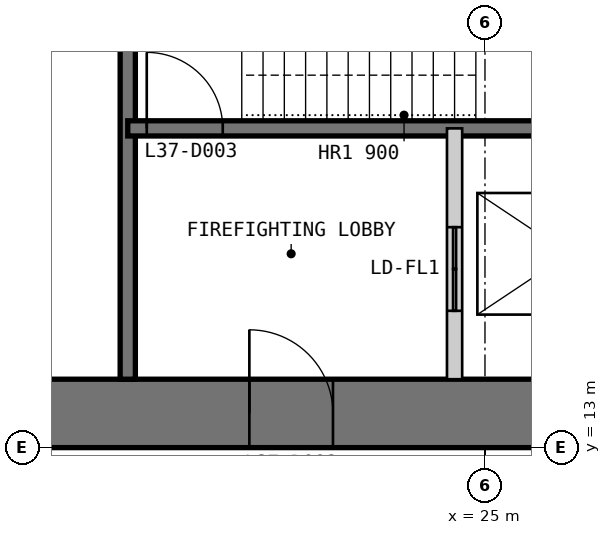
"""IFC4 building model, lengths in metres.
Left out: names, types, materials, properties, quantities, classifications, styles, units other than length and angle.
Written with IfcOpenShell. Run it as: python <this file> out.ifc"""

import sys

from ifc_helpers import new_model, si_unit, direction, frame, frame_2d, origin, place, context, subcontext, project, spatial, polyline, rectangle, outline, extrude, element, fill, save


model = new_model("IFC4")
c1 = context("Model", 3, precision=1e-05, world=origin(), true_north=direction((0.0, 1.0)))
c2 = subcontext(c1, "Body", "Model", "MODEL_VIEW")
j1 = project(units=[si_unit("LENGTHUNIT", "METRE"), si_unit("PLANEANGLEUNIT", "RADIAN")], contexts=[c1])
p1 = place(None, origin())
s1 = spatial("IfcSite", under=j1, at=p1, CompositionType="ELEMENT")
p2 = place(p1, origin())
s2 = spatial("IfcBuilding", under=s1, at=p2, CompositionType="ELEMENT")
p3 = place(p2, frame((0.0, 0.0, 158.4)))
s3 = spatial("IfcBuildingStorey", under=s2, at=p3, CompositionType="ELEMENT", Elevation=158.4)
p4 = place(p3, frame((13.0, 13.45, 0.0), z_axis=(0.0, 0.0, 1.0), x_axis=(1.0, 0.0, 0.0)))
e1 = element("IfcWall", 1, at=p4, inside=s3, PredefinedType="SHEAR", context=c2, shape_type="SweptSolid", body=[
    extrude(outline(polyline([(0.0, -0.45), (24.0, -0.45), (23.1, 0.45), (0.9, 0.45), (0.0, -0.45)])), origin(), (0.0, 0.0, 1.0), 4.0),
])
p5 = place(p4, frame((4.9, 0.0, 0.0)))
e2 = element("IfcOpeningElement", 2, at=p5, cuts=e1, PredefinedType="OPENING", context=c2, shape_type="SweptSolid", body=[
    extrude(rectangle(XDim=1.0, YDim=2.2, at=frame_2d((0.5, 1.1))), frame((0.0, 0.46, 0.0), z_axis=(0.0, -1.0, 0.0), x_axis=(1.0, 0.0, 0.0)), (0.0, 0.0, 1.0), 0.92),
])
p6 = place(p4, frame((8.9, 0.0, 0.0)))
e3 = element("IfcOpeningElement", 3, at=p6, cuts=e1, PredefinedType="OPENING", context=c2, shape_type="SweptSolid", body=[
    extrude(rectangle(XDim=1.1, YDim=2.2, at=frame_2d((0.55, 1.1))), frame((0.0, 0.46, 0.0), z_axis=(0.0, -1.0, 0.0), x_axis=(1.0, 0.0, 0.0)), (0.0, 0.0, 1.0), 0.92),
])
p7 = place(p4, frame((15.05, 0.0, 0.0)))
e4 = element("IfcOpeningElement", 4, at=p7, cuts=e1, PredefinedType="OPENING", context=c2, shape_type="SweptSolid", body=[
    extrude(rectangle(XDim=0.9, YDim=2.2, at=frame_2d((0.45, 1.1))), frame((0.0, 0.46, 0.0), z_axis=(0.0, -1.0, 0.0), x_axis=(1.0, 0.0, 0.0)), (0.0, 0.0, 1.0), 0.92),
])
p8 = place(p4, frame((17.9, 0.0, 0.0)))
e5 = element("IfcOpeningElement", 5, at=p8, cuts=e1, PredefinedType="OPENING", context=c2, shape_type="SweptSolid", body=[
    extrude(rectangle(XDim=1.0, YDim=2.2, at=frame_2d((0.5, 1.1))), frame((0.0, 0.46, 0.0), z_axis=(0.0, -1.0, 0.0), x_axis=(1.0, 0.0, 0.0)), (0.0, 0.0, 1.0), 0.92),
])
p9 = place(p4, frame((21.4, 0.0, 0.0)))
e6 = element("IfcOpeningElement", 6, at=p9, cuts=e1, PredefinedType="OPENING", context=c2, shape_type="SweptSolid", body=[
    extrude(rectangle(XDim=1.0, YDim=2.2, at=frame_2d((0.5, 1.1))), frame((0.0, 0.46, 0.0), z_axis=(0.0, -1.0, 0.0), x_axis=(1.0, 0.0, 0.0)), (0.0, 0.0, 1.0), 0.92),
])
p10 = place(p3, frame((20.3, 13.9, 0.0), z_axis=(0.0, 0.0, 1.0), x_axis=(0.0, 1.0, 0.0)))
e7 = element("IfcWall", 7, at=p10, inside=s3, PredefinedType="SOLIDWALL", context=c2, shape_type="SweptSolid", body=[
    extrude(rectangle(XDim=16.1, YDim=0.2, at=frame_2d((8.05, 0.0))), origin(), (0.0, 0.0, 1.0), 3.8),
])
p11 = place(p10, frame((7.217, 0.0, 0.0)))
e8 = element("IfcOpeningElement", 8, at=p11, cuts=e7, PredefinedType="OPENING", context=c2, shape_type="SweptSolid", body=[
    extrude(rectangle(XDim=1.1, YDim=2.2, at=frame_2d((0.55, 1.1))), frame((0.0, 0.11, 0.0), z_axis=(0.0, -1.0, 0.0), x_axis=(1.0, 0.0, 0.0)), (0.0, 0.0, 1.0), 0.22),
])
p12 = place(p10, frame((10.55, 0.0, 0.0)))
e9 = element("IfcOpeningElement", 9, at=p12, cuts=e7, PredefinedType="OPENING", context=c2, shape_type="SweptSolid", body=[
    extrude(rectangle(XDim=1.1, YDim=2.2, at=frame_2d((0.55, 1.1))), frame((0.0, 0.11, 0.0), z_axis=(0.0, -1.0, 0.0), x_axis=(1.0, 0.0, 0.0)), (0.0, 0.0, 1.0), 0.22),
])
p13 = place(p10, frame((13.883, 0.0, 0.0)))
e10 = element("IfcOpeningElement", 10, at=p13, cuts=e7, PredefinedType="OPENING", context=c2, shape_type="SweptSolid", body=[
    extrude(rectangle(XDim=1.1, YDim=2.2, at=frame_2d((0.55, 1.1))), frame((0.0, 0.11, 0.0), z_axis=(0.0, -1.0, 0.0), x_axis=(1.0, 0.0, 0.0)), (0.0, 0.0, 1.0), 0.22),
])
p14 = place(p3, frame((20.3, 17.2, 0.0), z_axis=(0.0, 0.0, 1.0), x_axis=(1.0, 0.0, 0.0)))
e11 = element("IfcWall", 11, at=p14, inside=s3, PredefinedType="SOLIDWALL", context=c2, shape_type="SweptSolid", body=[
    extrude(rectangle(XDim=9.4, YDim=0.2, at=frame_2d((4.7, 0.0))), origin(), (0.0, 0.0, 1.0), 3.8),
])
p15 = place(p14, frame((0.25, 0.0, 0.0)))
e12 = element("IfcOpeningElement", 12, at=p15, cuts=e11, PredefinedType="OPENING", context=c2, shape_type="SweptSolid", body=[
    extrude(rectangle(XDim=1.0, YDim=2.2, at=frame_2d((0.5, 1.1))), frame((0.0, 0.11, 0.0), z_axis=(0.0, -1.0, 0.0), x_axis=(1.0, 0.0, 0.0)), (0.0, 0.0, 1.0), 0.22),
])
p16 = place(p3, frame((24.6, 13.9, 0.0), z_axis=(0.0, 0.0, 1.0), x_axis=(0.0, 1.0, 0.0)))
e13 = element("IfcWall", 13, at=p16, inside=s3, PredefinedType="PARTITIONING", context=c2, shape_type="SweptSolid", body=[
    extrude(rectangle(XDim=3.3, YDim=0.2, at=frame_2d((1.65, 0.0))), origin(), (0.0, 0.0, 1.0), 3.8),
])
p17 = place(p16, frame((0.9, 0.0, 0.0)))
e14 = element("IfcOpeningElement", 14, at=p17, cuts=e13, PredefinedType="OPENING", context=c2, shape_type="SweptSolid", body=[
    extrude(rectangle(XDim=1.1, YDim=2.2, at=frame_2d((0.55, 1.1))), frame((0.0, 0.11, 0.0), z_axis=(0.0, -1.0, 0.0), x_axis=(1.0, 0.0, 0.0)), (0.0, 0.0, 1.0), 0.22),
])
p18 = place(p6, origin())
e15 = element("IfcDoor", 15, at=p18, inside=s3, OperationType="SINGLE_SWING_LEFT", PredefinedType="DOOR", context=c2, shape_type="SweptSolid", body=[
    extrude(rectangle(XDim=1.1, YDim=2.2, at=frame_2d((0.55, 1.1))), frame((0.0, 0.025, 0.0), z_axis=(0.0, -1.0, 0.0), x_axis=(1.0, 0.0, 0.0)), (0.0, 0.0, 1.0), 0.05),
    extrude(outline(polyline([(0.0, 0.0), (0.04, 0.0), (0.04, 2.16), (1.06, 2.16), (1.06, 0.0), (1.1, 0.0), (1.1, 2.2), (0.0, 2.2), (0.0, 0.0)])), frame((0.0, 0.3, 0.0), z_axis=(0.0, -1.0, 0.0), x_axis=(1.0, 0.0, 0.0)), (0.0, 0.0, 1.0), 0.6),
])
fill(e3, e15)
p19 = place(p15, origin())
e16 = element("IfcDoor", 16, at=p19, inside=s3, OperationType="SINGLE_SWING_LEFT", PredefinedType="DOOR", context=c2, shape_type="SweptSolid", body=[
    extrude(rectangle(XDim=1.0, YDim=2.2, at=frame_2d((0.5, 1.1))), frame((0.0, 0.025, 0.0), z_axis=(0.0, -1.0, 0.0), x_axis=(1.0, 0.0, 0.0)), (0.0, 0.0, 1.0), 0.05),
])
fill(e12, e16)
p20 = place(p17, origin())
e17 = element("IfcDoor", 17, at=p20, inside=s3, OperationType="DOUBLE_DOOR_SLIDING", PredefinedType="DOOR", context=c2, shape_type="SweptSolid", body=[
    extrude(rectangle(XDim=1.1, YDim=2.2, at=frame_2d((0.55, 1.1))), frame((0.0, 0.025, 0.0), z_axis=(0.0, -1.0, 0.0), x_axis=(1.0, 0.0, 0.0)), (0.0, 0.0, 1.0), 0.05),
])
fill(e14, e17)
save(model, sys.argv[1])
